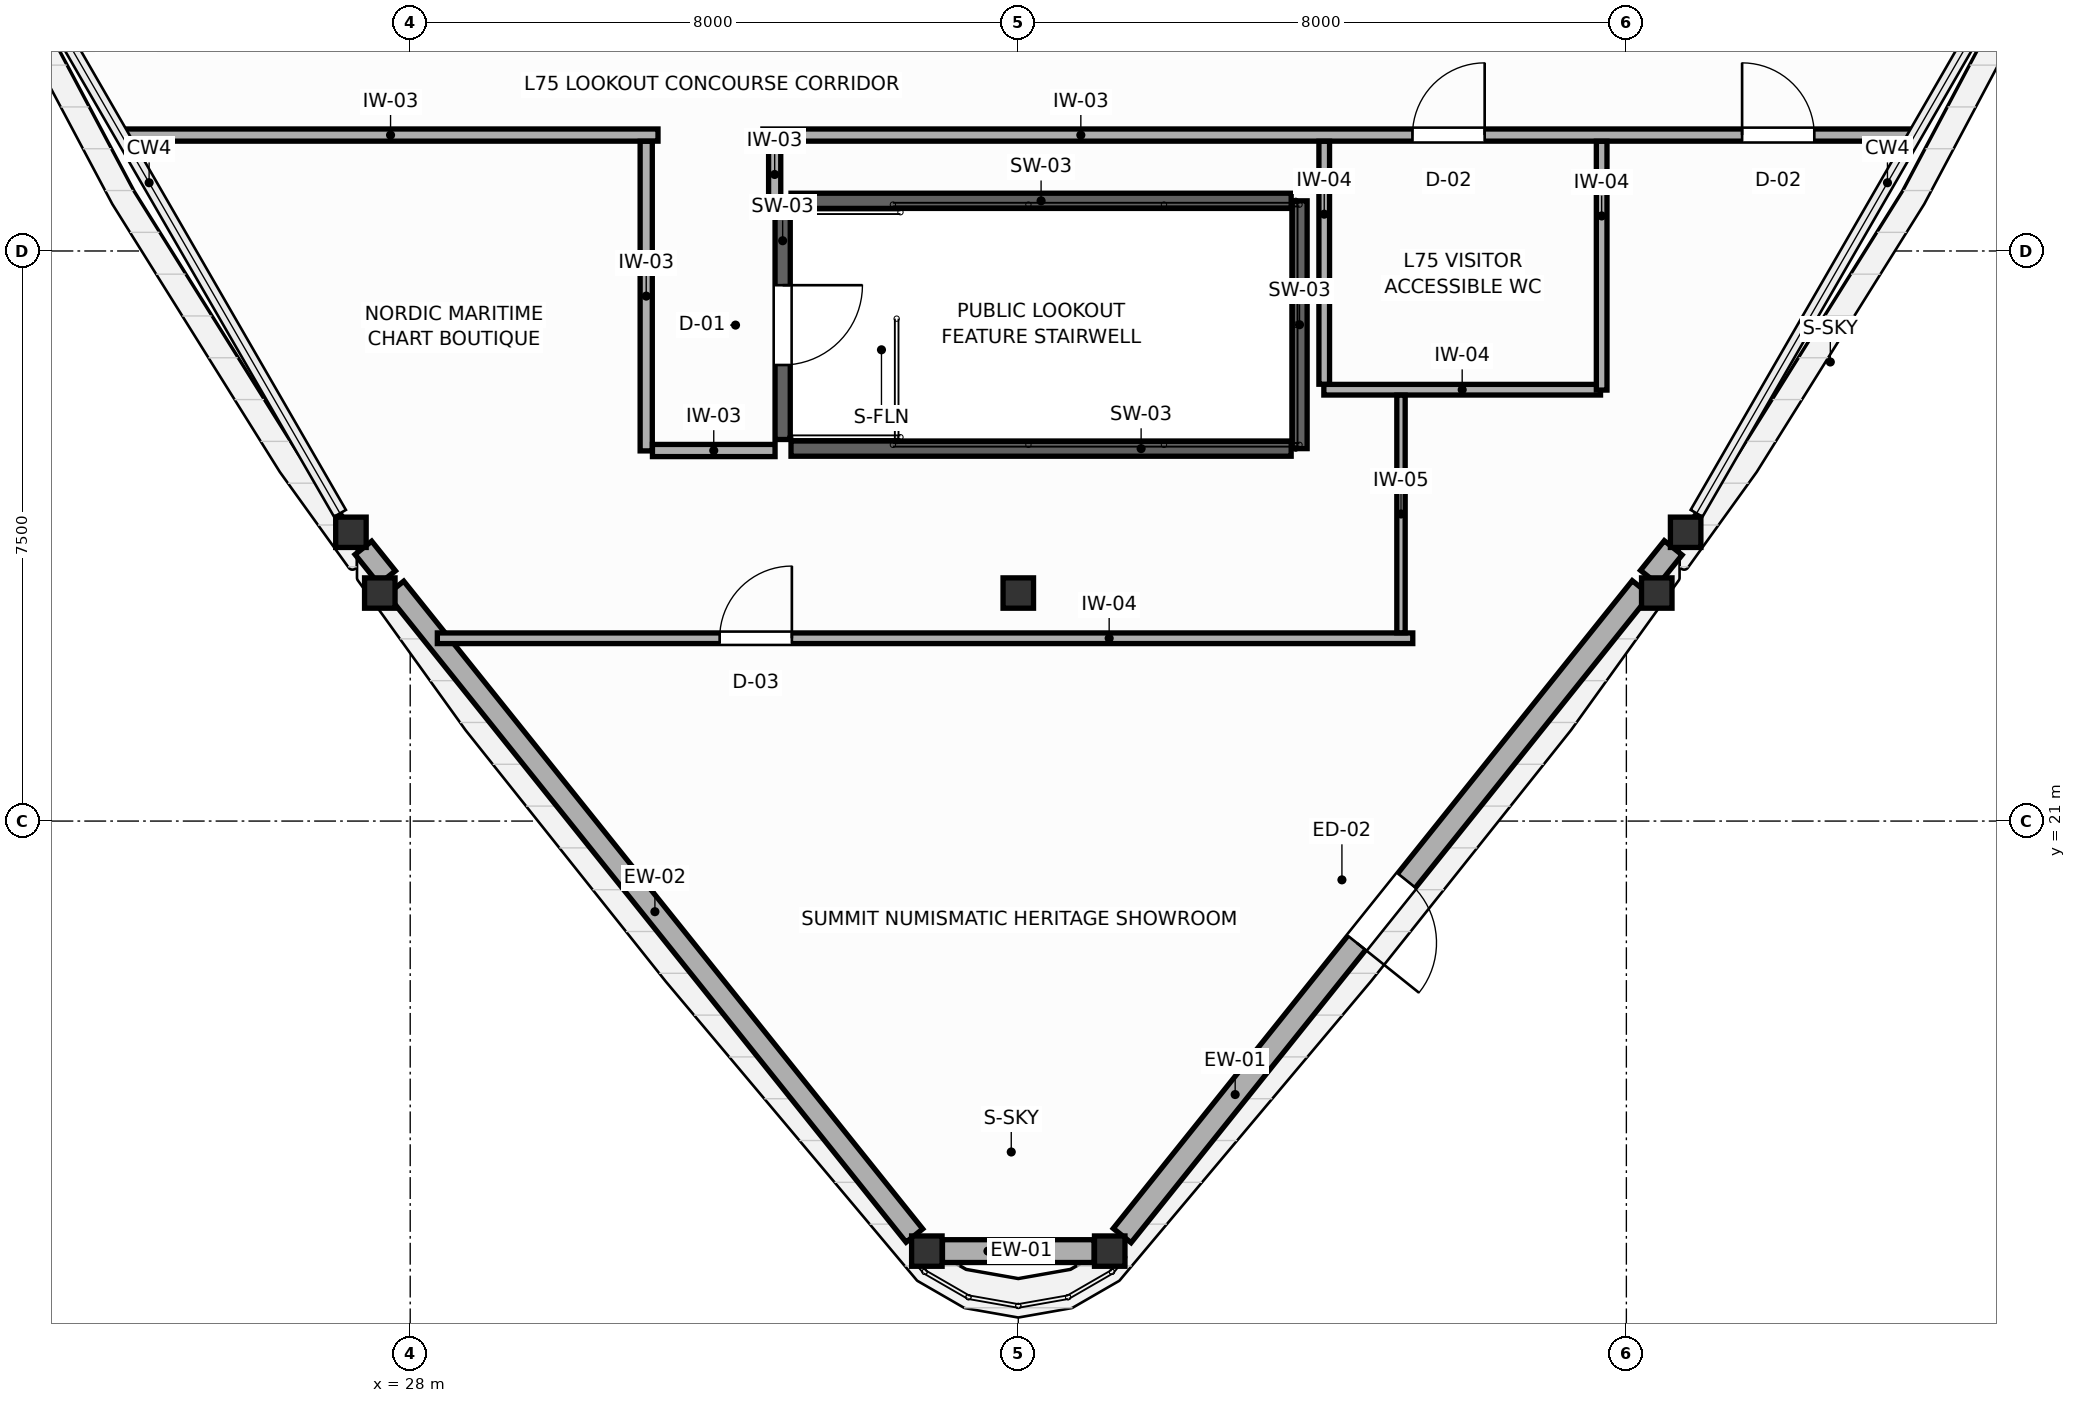
"""IFC4 building model, lengths in metres.
Left out: names, types, materials, properties, quantities, classifications, styles, units other than length and angle.
Written with IfcOpenShell. Run it as: python <this file> out.ifc"""

import sys

from ifc_helpers import new_model, si_unit, direction, frame, frame_2d, origin, origin_2d, place, context, subcontext, project, spatial, rectangle, i_section, extrude, source, transform, mapped, element, fill, save


model = new_model("IFC4")
c1 = context("Model", 3, precision=1e-05, world=origin(), true_north=direction((0.0, 1.0)))
c2 = subcontext(c1, "Body", "Model", "MODEL_VIEW")
j1 = project(units=[si_unit("LENGTHUNIT", "METRE"), si_unit("PLANEANGLEUNIT", "RADIAN")], contexts=[c1])
p1 = place(None, origin())
s1 = spatial("IfcSite", under=j1, at=p1, CompositionType="ELEMENT")
p2 = place(p1, origin())
s2 = spatial("IfcBuilding", under=s1, at=p2, CompositionType="ELEMENT")
p3 = place(p2, frame((0.0, 0.0, 288.0)))
s3 = spatial("IfcBuildingStorey", under=s2, at=p3, CompositionType="ELEMENT", Elevation=288.0)
m1 = source(origin(), c2, "Body", "SweptSolid", [
    extrude(i_section(OverallWidth=0.401, OverallDepth=0.399, WebThickness=0.022, FlangeThickness=0.036, FilletRadius=0.015, at=origin_2d()), origin(), (0.0, 0.0, 1.0), 4.2),
])
for number, where, z_axis, x_axis in (
    (1, (27.6, 24.0, 0.0), (0.0, 0.0, 1.0), (1.0, 0.0, 0.0)),
    (2, (44.4, 24.0, 0.0), (0.0, 0.0, 1.0), (1.0, 0.0, 0.0)),
    (3, (36.0, 24.0, 0.0), (0.0, 0.0, 1.0), (1.0, 0.0, 0.0)),
    (4, (27.22, 24.799, 0.0), (0.0, 0.0, 1.0), (1.0, 0.0, 0.0)),
    (5, (34.797, 15.342, 0.0), (0.0, 0.0, 1.0), (1.0, 0.0, 0.0)),
    (6, (37.203, 15.342, 0.0), (0.0, 0.0, 1.0), (1.0, 0.0, 0.0)),
    (7, (44.78, 24.799, 0.0), (0.0, 0.0, 1.0), (1.0, 0.0, 0.0)),
):
    element("IfcColumn", number, at=place(p3, frame(where, z_axis=z_axis, x_axis=x_axis)), inside=s3, PredefinedType="COLUMN", context=c2, shape_type="MappedRepresentation", body=[
        mapped(m1, transform((0.0, 0.0, 0.0), scale=1.0)),
    ])
p4 = place(p3, frame((27.384, 24.595, 0.0), z_axis=(0.0, 0.0, 1.0), x_axis=(0.625468820951, -0.780249161498, 0.0)))
e8 = element("IfcWall", 8, at=p4, inside=s3, PredefinedType="SOLIDWALL", context=c2, shape_type="SweptSolid", body=[
    extrude(rectangle(XDim=0.5, YDim=0.28, at=frame_2d((0.25, 0.0))), origin(), (0.0, 0.0, 1.0), 2.51),
])
p5 = place(p3, frame((27.805, 24.069, 0.0), z_axis=(0.0, 0.0, 1.0), x_axis=(0.625281082592, -0.780399620549, 0.0)))
e9 = element("IfcWall", 9, at=p5, inside=s3, PredefinedType="SOLIDWALL", context=c2, shape_type="SweptSolid", body=[
    extrude(rectangle(XDim=10.92, YDim=0.28, at=frame_2d((5.46, 0.0))), origin(), (0.0, 0.0, 1.0), 2.51),
])
p6 = place(p3, frame((35.002, 15.342, 0.0), z_axis=(0.0, 0.0, 1.0), x_axis=(1.0, 0.0, 0.0)))
e10 = element("IfcWall", 10, at=p6, inside=s3, PredefinedType="SOLIDWALL", context=c2, shape_type="SweptSolid", body=[
    extrude(rectangle(XDim=1.995, YDim=0.3, at=frame_2d((0.998, 0.0))), origin(), (0.0, 0.0, 1.0), 2.51),
])
p7 = place(p3, frame((37.367, 15.547, 0.0), z_axis=(0.0, 0.0, 1.0), x_axis=(0.625281082592, 0.780399620549, 0.0)))
e11 = element("IfcWall", 11, at=p7, inside=s3, PredefinedType="SOLIDWALL", context=c2, shape_type="SweptSolid", body=[
    extrude(rectangle(XDim=10.92, YDim=0.3, at=frame_2d((5.46, 0.0))), origin(), (0.0, 0.0, 1.0), 2.51),
])
p8 = place(p7, frame((4.935, 0.0, 0.0)))
e12 = element("IfcOpeningElement", 12, at=p8, cuts=e11, PredefinedType="OPENING", context=c2, shape_type="SweptSolid", body=[
    extrude(rectangle(XDim=1.05, YDim=2.1, at=frame_2d((0.525, 1.05))), frame((0.0, 0.16, 0.0), z_axis=(0.0, -1.0, 0.0), x_axis=(1.0, 0.0, 0.0)), (0.0, 0.0, 1.0), 0.32),
])
p9 = place(p3, frame((44.303, 24.205, 0.0), z_axis=(0.0, 0.0, 1.0), x_axis=(0.625468820951, 0.780249161498, 0.0)))
e13 = element("IfcWall", 13, at=p9, inside=s3, PredefinedType="SOLIDWALL", context=c2, shape_type="SweptSolid", body=[
    extrude(rectangle(XDim=0.5, YDim=0.3, at=frame_2d((0.25, 0.0))), origin(), (0.0, 0.0, 1.0), 2.51),
])
p10 = place(p3, frame((32.9, 26.02, 0.0), z_axis=(0.0, 0.0, 1.0), x_axis=(0.0, 1.0, 0.0)))
e14 = element("IfcWall", 14, at=p10, inside=s3, PredefinedType="SHEAR", context=c2, shape_type="SweptSolid", body=[
    extrude(rectangle(XDim=3.02, YDim=0.2, at=frame_2d((1.51, 0.0))), origin(), (0.0, 0.0, 1.0), 4.2),
])
p11 = place(p10, frame((0.98, 0.0, 0.0)))
e15 = element("IfcOpeningElement", 15, at=p11, cuts=e14, PredefinedType="OPENING", context=c2, shape_type="SweptSolid", body=[
    extrude(rectangle(XDim=1.05, YDim=2.1, at=frame_2d((0.525, 1.05))), frame((0.0, 0.11, 0.0), z_axis=(0.0, -1.0, 0.0), x_axis=(1.0, 0.0, 0.0)), (0.0, 0.0, 1.0), 0.22),
])
for number, where, z_axis, x_axis in (
    (16, (33.01, 29.16, 0.0), (0.0, 0.0, 1.0), (1.0, 0.0, 0.0)),
    (17, (33.01, 25.9, 0.0), (0.0, 0.0, 1.0), (1.0, 0.0, 0.0)),
):
    element("IfcWall", number, at=place(p3, frame(where, z_axis=z_axis, x_axis=x_axis)), inside=s3, PredefinedType="SHEAR", context=c2, shape_type="SweptSolid", body=[
        extrude(rectangle(XDim=6.58, YDim=0.2, at=frame_2d((3.29, 0.0))), origin(), (0.0, 0.0, 1.0), 4.2),
    ])
p12 = place(p3, frame((39.7, 25.9, 0.0), z_axis=(0.0, 0.0, 1.0), x_axis=(0.0, 1.0, 0.0)))
e18 = element("IfcWall", 18, at=p12, inside=s3, PredefinedType="SHEAR", context=c2, shape_type="SweptSolid", body=[
    extrude(rectangle(XDim=3.26, YDim=0.2, at=frame_2d((1.63, 0.0))), origin(), (0.0, 0.0, 1.0), 4.2),
])
p13 = place(p3, frame((32.64, 30.025, 0.0), z_axis=(0.0, 0.0, 1.0), x_axis=(1.0, 0.0, 0.0)))
e19 = element("IfcWall", 19, at=p13, inside=s3, PredefinedType="PARTITIONING", context=c2, shape_type="SweptSolid", body=[
    extrude(rectangle(XDim=15.154, YDim=0.16, at=frame_2d((7.577, 0.0))), origin(), (0.0, 0.0, 1.0), 3.95),
])
p14 = place(p13, frame((8.546, 0.0, 0.0)))
e20 = element("IfcOpeningElement", 20, at=p14, cuts=e19, PredefinedType="OPENING", context=c2, shape_type="SweptSolid", body=[
    extrude(rectangle(XDim=0.95, YDim=2.05, at=frame_2d((0.475, 1.025))), frame((0.0, 0.09, 0.0), z_axis=(0.0, -1.0, 0.0), x_axis=(1.0, 0.0, 0.0)), (0.0, 0.0, 1.0), 0.18),
])
p15 = place(p13, frame((12.883, 0.0, 0.0)))
e21 = element("IfcOpeningElement", 21, at=p15, cuts=e19, PredefinedType="OPENING", context=c2, shape_type="SweptSolid", body=[
    extrude(rectangle(XDim=0.95, YDim=2.05, at=frame_2d((0.475, 1.025))), frame((0.0, 0.09, 0.0), z_axis=(0.0, -1.0, 0.0), x_axis=(1.0, 0.0, 0.0)), (0.0, 0.0, 1.0), 0.18),
])
p16 = place(p3, frame((24.223, 30.025, 0.0), z_axis=(0.0, 0.0, 1.0), x_axis=(1.0, 0.0, 0.0)))
e22 = element("IfcWall", 22, at=p16, inside=s3, PredefinedType="PARTITIONING", context=c2, shape_type="SweptSolid", body=[
    extrude(rectangle(XDim=7.037, YDim=0.16, at=frame_2d((3.519, 0.0))), origin(), (0.0, 0.0, 1.0), 3.95),
])
p17 = place(p3, frame((31.105, 25.87, 0.0), z_axis=(0.0, 0.0, 1.0), x_axis=(0.0, 1.0, 0.0)))
e23 = element("IfcWall", 23, at=p17, inside=s3, PredefinedType="PARTITIONING", context=c2, shape_type="SweptSolid", body=[
    extrude(rectangle(XDim=4.073, YDim=0.16, at=frame_2d((2.037, 0.0))), origin(), (0.0, 0.0, 1.0), 3.95),
])
p18 = place(p3, frame((31.187, 25.875, 0.0), z_axis=(0.0, 0.0, 1.0), x_axis=(1.0, 0.0, 0.0)))
e24 = element("IfcWall", 24, at=p18, inside=s3, PredefinedType="PARTITIONING", context=c2, shape_type="SweptSolid", body=[
    extrude(rectangle(XDim=1.613, YDim=0.16, at=frame_2d((0.807, 0.0))), origin(), (0.0, 0.0, 1.0), 3.95),
])
p19 = place(p3, frame((32.795, 29.07, 0.0), z_axis=(0.0, 0.0, 1.0), x_axis=(0.0, 1.0, 0.0)))
e25 = element("IfcWall", 25, at=p19, inside=s3, PredefinedType="PARTITIONING", context=c2, shape_type="SweptSolid", body=[
    extrude(rectangle(XDim=0.873, YDim=0.16, at=frame_2d((0.437, 0.0))), origin(), (0.0, 0.0, 1.0), 3.95),
])
p20 = place(p3, frame((28.357, 23.405, 0.0), z_axis=(0.0, 0.0, 1.0), x_axis=(1.0, 0.0, 0.0)))
e26 = element("IfcWall", 26, at=p20, inside=s3, PredefinedType="PARTITIONING", context=c2, shape_type="SweptSolid", body=[
    extrude(rectangle(XDim=12.833, YDim=0.14, at=frame_2d((6.417, 0.0))), origin(), (0.0, 0.0, 1.0), 3.95),
])
p21 = place(p20, frame((3.714, 0.0, 0.0)))
e27 = element("IfcOpeningElement", 27, at=p21, cuts=e26, PredefinedType="OPENING", context=c2, shape_type="SweptSolid", body=[
    extrude(rectangle(XDim=0.95, YDim=2.05, at=frame_2d((0.475, 1.025))), frame((0.0, 0.08, 0.0), z_axis=(0.0, -1.0, 0.0), x_axis=(1.0, 0.0, 0.0)), (0.0, 0.0, 1.0), 0.16),
])
p22 = place(p3, frame((40.02, 26.675, 0.0), z_axis=(0.0, 0.0, 1.0), x_axis=(1.0, 0.0, 0.0)))
e28 = element("IfcWall", 28, at=p22, inside=s3, PredefinedType="PARTITIONING", context=c2, shape_type="SweptSolid", body=[
    extrude(rectangle(XDim=3.64, YDim=0.14, at=frame_2d((1.82, 0.0))), origin(), (0.0, 0.0, 1.0), 3.95),
])
p23 = place(p3, frame((43.675, 26.67, 0.0), z_axis=(0.0, 0.0, 1.0), x_axis=(0.0, 1.0, 0.0)))
e29 = element("IfcWall", 29, at=p23, inside=s3, PredefinedType="PARTITIONING", context=c2, shape_type="SweptSolid", body=[
    extrude(rectangle(XDim=3.273, YDim=0.14, at=frame_2d((1.637, 0.0))), origin(), (0.0, 0.0, 1.0), 3.95),
])
p24 = place(p3, frame((40.025, 26.747, 0.0), z_axis=(0.0, 0.0, 1.0), x_axis=(0.0, 1.0, 0.0)))
e30 = element("IfcWall", 30, at=p24, inside=s3, PredefinedType="PARTITIONING", context=c2, shape_type="SweptSolid", body=[
    extrude(rectangle(XDim=3.196, YDim=0.14, at=frame_2d((1.598, 0.0))), origin(), (0.0, 0.0, 1.0), 3.95),
])
p25 = place(p3, frame((41.035, 23.477, 0.0), z_axis=(0.0, 0.0, 1.0), x_axis=(0.0, 1.0, 0.0)))
e31 = element("IfcWall", 31, at=p25, inside=s3, PredefinedType="MOVABLE", context=c2, shape_type="SweptSolid", body=[
    extrude(rectangle(XDim=3.126, YDim=0.11, at=frame_2d((1.563, 0.0))), origin(), (0.0, 0.0, 1.0), 3.95),
])
p26 = place(p8, frame((1.05, 0.0, 0.0), z_axis=(0.0, 0.0, 1.0), x_axis=(-1.0, 0.0, 0.0)))
e32 = element("IfcDoor", 32, at=p26, inside=s3, OperationType="SINGLE_SWING_RIGHT", PredefinedType="DOOR", context=c2, shape_type="SweptSolid", body=[
    extrude(rectangle(XDim=1.05, YDim=2.1, at=frame_2d((0.525, 1.05))), frame((0.0, 0.025, 0.0), z_axis=(0.0, -1.0, 0.0), x_axis=(1.0, 0.0, 0.0)), (0.0, 0.0, 1.0), 0.05),
])
fill(e12, e32)
p27 = place(p11, frame((1.05, 0.0, 0.0), z_axis=(0.0, 0.0, 1.0), x_axis=(-1.0, 0.0, 0.0)))
e33 = element("IfcDoor", 33, at=p27, inside=s3, OperationType="SINGLE_SWING_LEFT", PredefinedType="DOOR", context=c2, shape_type="SweptSolid", body=[
    extrude(rectangle(XDim=1.05, YDim=2.1, at=frame_2d((0.525, 1.05))), frame((0.0, 0.025, 0.0), z_axis=(0.0, -1.0, 0.0), x_axis=(1.0, 0.0, 0.0)), (0.0, 0.0, 1.0), 0.05),
])
fill(e15, e33)
p28 = place(p14, origin())
e34 = element("IfcDoor", 34, at=p28, inside=s3, OperationType="SINGLE_SWING_RIGHT", PredefinedType="DOOR", context=c2, shape_type="SweptSolid", body=[
    extrude(rectangle(XDim=0.95, YDim=2.05, at=frame_2d((0.475, 1.025))), frame((0.0, 0.025, 0.0), z_axis=(0.0, -1.0, 0.0), x_axis=(1.0, 0.0, 0.0)), (0.0, 0.0, 1.0), 0.05),
])
fill(e20, e34)
p29 = place(p15, origin())
e35 = element("IfcDoor", 35, at=p29, inside=s3, OperationType="SINGLE_SWING_LEFT", PredefinedType="DOOR", context=c2, shape_type="SweptSolid", body=[
    extrude(rectangle(XDim=0.95, YDim=2.05, at=frame_2d((0.475, 1.025))), frame((0.0, 0.025, 0.0), z_axis=(0.0, -1.0, 0.0), x_axis=(1.0, 0.0, 0.0)), (0.0, 0.0, 1.0), 0.05),
])
fill(e21, e35)
p30 = place(p21, origin())
e36 = element("IfcDoor", 36, at=p30, inside=s3, OperationType="SINGLE_SWING_RIGHT", PredefinedType="DOOR", context=c2, shape_type="SweptSolid", body=[
    extrude(rectangle(XDim=0.95, YDim=2.05, at=frame_2d((0.475, 1.025))), frame((0.0, 0.025, 0.0), z_axis=(0.0, -1.0, 0.0), x_axis=(1.0, 0.0, 0.0)), (0.0, 0.0, 1.0), 0.05),
])
fill(e27, e36)
save(model, sys.argv[1])
